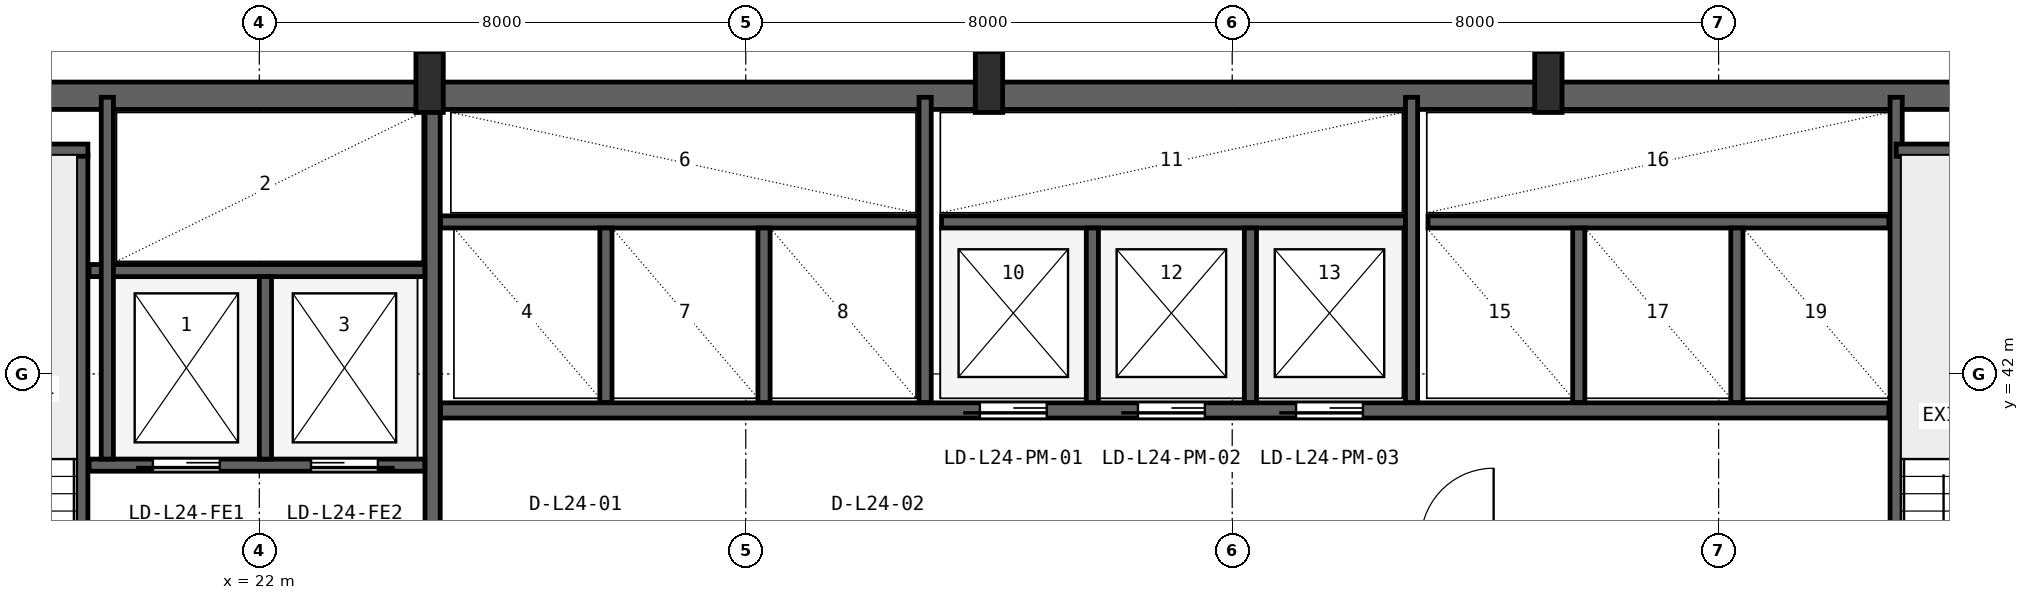
"""IFC4 building model, lengths in metres.
Left out: names, types, materials, properties, quantities, classifications, styles, units other than length and angle.
Written with IfcOpenShell. Run it as: python <this file> out.ifc"""

import sys

from ifc_helpers import new_model, si_unit, direction, frame, frame_2d, origin, origin_2d, place, context, subcontext, project, spatial, rectangle, i_section, extrude, source, transform, mapped, element, fill, save


model = new_model("IFC4")
c1 = context("Model", 3, precision=1e-05, world=origin(), true_north=direction((0.0, 1.0)))
c2 = subcontext(c1, "Body", "Model", "MODEL_VIEW")
j1 = project(units=[si_unit("LENGTHUNIT", "METRE"), si_unit("PLANEANGLEUNIT", "RADIAN")], contexts=[c1])
p1 = place(None, origin())
s1 = spatial("IfcSite", under=j1, at=p1, CompositionType="ELEMENT")
p2 = place(p1, origin())
s2 = spatial("IfcBuilding", under=s1, at=p2, CompositionType="ELEMENT")
p3 = place(p2, frame((0.0, 0.0, 103.0)))
s3 = spatial("IfcBuildingStorey", under=s2, at=p3, CompositionType="ELEMENT", Elevation=103.0)
p4 = place(p3, frame((15.6, 46.575, 0.0), z_axis=(0.0, 0.0, 1.0), x_axis=(1.0, 0.0, 0.0)))
e1 = element("IfcWall", 1, at=p4, inside=s3, PredefinedType="SHEAR", context=c2, shape_type="SweptSolid", body=[
    extrude(rectangle(XDim=36.8, YDim=0.45, at=frame_2d((18.4, 0.0))), origin(), (0.0, 0.0, 1.0), 3.55),
])
m1 = source(origin(), c2, "Body", "SweptSolid", [
    extrude(i_section(OverallWidth=0.45, OverallDepth=1.0, WebThickness=0.016, FlangeThickness=0.03, FilletRadius=0.016, at=origin_2d()), origin(), (0.0, 0.0, 1.0), 3.8),
])
for number, where, z_axis, x_axis in (
    (2, (24.8, 46.8, 0.0), (0.0, 0.0, 1.0), (1.0, 0.0, 0.0)),
    (3, (34.0, 46.8, 0.0), (0.0, 0.0, 1.0), (1.0, 0.0, 0.0)),
    (4, (43.2, 46.8, 0.0), (0.0, 0.0, 1.0), (1.0, 0.0, 0.0)),
):
    element("IfcColumn", number, at=place(p3, frame(where, z_axis=z_axis, x_axis=x_axis)), inside=s3, PredefinedType="COLUMN", context=c2, shape_type="MappedRepresentation", body=[
        mapped(m1, transform((0.0, 0.0, 0.0), x_axis=(1.0, 0.0, 0.0), y_axis=(0.0, 1.0, 0.0), z_axis=(0.0, 0.0, 1.0), scale=1.0)),
    ])
p5 = place(p3, frame((19.08, 35.95, 0.0), z_axis=(0.0, 0.0, 1.0), x_axis=(0.0, 1.0, 0.0)))
e5 = element("IfcWall", 5, at=p5, inside=s3, PredefinedType="SHEAR", context=c2, shape_type="SweptSolid", body=[
    extrude(rectangle(XDim=9.65, YDim=0.2, at=frame_2d((4.825, 0.0))), origin(), (0.0, 0.0, 1.0), 3.55),
])
p6 = place(p5, frame((0.25, 0.0, 0.0)))
e6 = element("IfcOpeningElement", 6, at=p6, cuts=e5, PredefinedType="OPENING", context=c2, shape_type="SweptSolid", body=[
    extrude(rectangle(XDim=0.95, YDim=2.1, at=frame_2d((0.475, 1.05))), frame((0.0, 0.11, 0.0), z_axis=(0.0, -1.0, 0.0), x_axis=(1.0, 0.0, 0.0)), (0.0, 0.0, 1.0), 0.22),
])
p7 = place(p3, frame((15.95, 45.68, 0.0), z_axis=(0.0, 0.0, 1.0), x_axis=(1.0, 0.0, 0.0)))
e7 = element("IfcWall", 7, at=p7, inside=s3, PredefinedType="SHEAR", context=c2, shape_type="SweptSolid", body=[
    extrude(rectangle(XDim=3.23, YDim=0.2, at=frame_2d((1.615, 0.0))), origin(), (0.0, 0.0, 1.0), 3.55),
])
p8 = place(p3, frame((24.85, 36.05, 0.0), z_axis=(0.0, 0.0, 1.0), x_axis=(0.0, 1.0, 0.0)))
e8 = element("IfcWall", 8, at=p8, inside=s3, PredefinedType="SHEAR", context=c2, shape_type="SweptSolid", body=[
    extrude(rectangle(XDim=10.45, YDim=0.25, at=frame_2d((5.225, 0.0))), origin(), (0.0, 0.0, 1.0), 3.55),
])
p9 = place(p3, frame((19.2, 40.5, 0.0), z_axis=(0.0, 0.0, 1.0), x_axis=(1.0, 0.0, 0.0)))
e9 = element("IfcWall", 9, at=p9, inside=s3, PredefinedType="SHEAR", context=c2, shape_type="SweptSolid", body=[
    extrude(rectangle(XDim=5.52, YDim=0.2, at=frame_2d((2.76, 0.0))), origin(), (0.0, 0.0, 1.0), 3.55),
])
p10 = place(p9, frame((1.05, 0.0, 0.0)))
e10 = element("IfcOpeningElement", 10, at=p10, cuts=e9, PredefinedType="OPENING", context=c2, shape_type="SweptSolid", body=[
    extrude(rectangle(XDim=1.1, YDim=2.18, at=frame_2d((0.55, 1.09))), frame((0.0, 0.11, 0.0), z_axis=(0.0, -1.0, 0.0), x_axis=(1.0, 0.0, 0.0)), (0.0, 0.0, 1.0), 0.22),
])
p11 = place(p9, frame((3.65, 0.0, 0.0)))
e11 = element("IfcOpeningElement", 11, at=p11, cuts=e9, PredefinedType="OPENING", context=c2, shape_type="SweptSolid", body=[
    extrude(rectangle(XDim=1.1, YDim=2.18, at=frame_2d((0.55, 1.09))), frame((0.0, 0.11, 0.0), z_axis=(0.0, -1.0, 0.0), x_axis=(1.0, 0.0, 0.0)), (0.0, 0.0, 1.0), 0.22),
])
p12 = place(p3, frame((19.2, 43.7, 0.0), z_axis=(0.0, 0.0, 1.0), x_axis=(1.0, 0.0, 0.0)))
e12 = element("IfcWall", 12, at=p12, inside=s3, PredefinedType="SHEAR", context=c2, shape_type="SweptSolid", body=[
    extrude(rectangle(XDim=5.52, YDim=0.2, at=frame_2d((2.76, 0.0))), origin(), (0.0, 0.0, 1.0), 3.55),
])
p13 = place(p3, frame((22.1, 40.6, 0.0), z_axis=(0.0, 0.0, 1.0), x_axis=(0.0, 1.0, 0.0)))
e13 = element("IfcWall", 13, at=p13, inside=s3, PredefinedType="SHEAR", context=c2, shape_type="SweptSolid", body=[
    extrude(rectangle(XDim=3.0, YDim=0.2, at=frame_2d((1.5, 0.0))), origin(), (0.0, 0.0, 1.0), 3.55),
])
p14 = place(p3, frame((19.5, 40.6, 0.0), z_axis=(0.0, 0.0, 1.0), x_axis=(0.0, 1.0, 0.0)))
e14 = element("IfcWall", 14, at=p14, inside=s3, PredefinedType="SHEAR", context=c2, shape_type="SweptSolid", body=[
    extrude(rectangle(XDim=5.95, YDim=0.2, at=frame_2d((2.975, 0.0))), origin(), (0.0, 0.0, 1.0), 3.55),
])
p15 = place(p3, frame((48.92, 36.05, 0.0), z_axis=(0.0, 0.0, 1.0), x_axis=(0.0, 1.0, 0.0)))
e15 = element("IfcWall", 15, at=p15, inside=s3, PredefinedType="SHEAR", context=c2, shape_type="SweptSolid", body=[
    extrude(rectangle(XDim=10.5, YDim=0.2, at=frame_2d((5.25, 0.0))), origin(), (0.0, 0.0, 1.0), 3.55),
])
p16 = place(p3, frame((48.92, 45.68, 0.0), z_axis=(0.0, 0.0, 1.0), x_axis=(1.0, 0.0, 0.0)))
e16 = element("IfcWall", 16, at=p16, inside=s3, PredefinedType="SHEAR", context=c2, shape_type="SweptSolid", body=[
    extrude(rectangle(XDim=3.18, YDim=0.2, at=frame_2d((1.59, 0.0))), origin(), (0.0, 0.0, 1.0), 3.55),
])
p17 = place(p3, frame((24.98, 41.4, 0.0), z_axis=(0.0, 0.0, 1.0), x_axis=(1.0, 0.0, 0.0)))
e17 = element("IfcWall", 17, at=p17, inside=s3, PredefinedType="SHEAR", context=c2, shape_type="SweptSolid", body=[
    extrude(rectangle(XDim=23.82, YDim=0.25, at=frame_2d((11.91, 0.0))), origin(), (0.0, 0.0, 1.0), 3.55),
])
p18 = place(p17, frame((8.87, 0.0, 0.0)))
e18 = element("IfcOpeningElement", 18, at=p18, cuts=e17, PredefinedType="OPENING", context=c2, shape_type="SweptSolid", body=[
    extrude(rectangle(XDim=1.1, YDim=2.18, at=frame_2d((0.55, 1.09))), frame((0.0, 0.135, 0.0), z_axis=(0.0, -1.0, 0.0), x_axis=(1.0, 0.0, 0.0)), (0.0, 0.0, 1.0), 0.27),
])
p19 = place(p17, frame((11.47, 0.0, 0.0)))
e19 = element("IfcOpeningElement", 19, at=p19, cuts=e17, PredefinedType="OPENING", context=c2, shape_type="SweptSolid", body=[
    extrude(rectangle(XDim=1.1, YDim=2.18, at=frame_2d((0.55, 1.09))), frame((0.0, 0.135, 0.0), z_axis=(0.0, -1.0, 0.0), x_axis=(1.0, 0.0, 0.0)), (0.0, 0.0, 1.0), 0.27),
])
p20 = place(p17, frame((14.07, 0.0, 0.0)))
e20 = element("IfcOpeningElement", 20, at=p20, cuts=e17, PredefinedType="OPENING", context=c2, shape_type="SweptSolid", body=[
    extrude(rectangle(XDim=1.1, YDim=2.18, at=frame_2d((0.55, 1.09))), frame((0.0, 0.135, 0.0), z_axis=(0.0, -1.0, 0.0), x_axis=(1.0, 0.0, 0.0)), (0.0, 0.0, 1.0), 0.27),
])
p21 = place(p3, frame((24.98, 44.5, 0.0), z_axis=(0.0, 0.0, 1.0), x_axis=(1.0, 0.0, 0.0)))
e21 = element("IfcWall", 21, at=p21, inside=s3, PredefinedType="SHEAR", context=c2, shape_type="SweptSolid", body=[
    extrude(rectangle(XDim=7.87, YDim=0.2, at=frame_2d((3.935, 0.0))), origin(), (0.0, 0.0, 1.0), 3.55),
])
for number, where, z_axis, x_axis in (
    (22, (27.7, 41.53, 0.0), (0.0, 0.0, 1.0), (0.0, 1.0, 0.0)),
    (23, (30.3, 41.53, 0.0), (0.0, 0.0, 1.0), (0.0, 1.0, 0.0)),
):
    element("IfcWall", number, at=place(p3, frame(where, z_axis=z_axis, x_axis=x_axis)), inside=s3, PredefinedType="SHEAR", context=c2, shape_type="SweptSolid", body=[
        extrude(rectangle(XDim=2.87, YDim=0.2, at=frame_2d((1.435, 0.0))), origin(), (0.0, 0.0, 1.0), 3.55),
    ])
p22 = place(p3, frame((32.95, 41.53, 0.0), z_axis=(0.0, 0.0, 1.0), x_axis=(0.0, 1.0, 0.0)))
e24 = element("IfcWall", 24, at=p22, inside=s3, PredefinedType="SHEAR", context=c2, shape_type="SweptSolid", body=[
    extrude(rectangle(XDim=5.02, YDim=0.2, at=frame_2d((2.51, 0.0))), origin(), (0.0, 0.0, 1.0), 3.55),
])
p23 = place(p3, frame((33.22, 44.5, 0.0), z_axis=(0.0, 0.0, 1.0), x_axis=(1.0, 0.0, 0.0)))
e25 = element("IfcWall", 25, at=p23, inside=s3, PredefinedType="SHEAR", context=c2, shape_type="SweptSolid", body=[
    extrude(rectangle(XDim=7.63, YDim=0.2, at=frame_2d((3.815, 0.0))), origin(), (0.0, 0.0, 1.0), 3.55),
])
for number, where, z_axis, x_axis in (
    (26, (35.7, 41.53, 0.0), (0.0, 0.0, 1.0), (0.0, 1.0, 0.0)),
    (27, (38.3, 41.53, 0.0), (0.0, 0.0, 1.0), (0.0, 1.0, 0.0)),
):
    element("IfcWall", number, at=place(p3, frame(where, z_axis=z_axis, x_axis=x_axis)), inside=s3, PredefinedType="SHEAR", context=c2, shape_type="SweptSolid", body=[
        extrude(rectangle(XDim=2.87, YDim=0.2, at=frame_2d((1.435, 0.0))), origin(), (0.0, 0.0, 1.0), 3.55),
    ])
p24 = place(p3, frame((40.95, 41.53, 0.0), z_axis=(0.0, 0.0, 1.0), x_axis=(0.0, 1.0, 0.0)))
e28 = element("IfcWall", 28, at=p24, inside=s3, PredefinedType="SHEAR", context=c2, shape_type="SweptSolid", body=[
    extrude(rectangle(XDim=5.02, YDim=0.2, at=frame_2d((2.51, 0.0))), origin(), (0.0, 0.0, 1.0), 3.55),
])
p25 = place(p3, frame((41.22, 44.5, 0.0), z_axis=(0.0, 0.0, 1.0), x_axis=(1.0, 0.0, 0.0)))
e29 = element("IfcWall", 29, at=p25, inside=s3, PredefinedType="SHEAR", context=c2, shape_type="SweptSolid", body=[
    extrude(rectangle(XDim=7.58, YDim=0.2, at=frame_2d((3.79, 0.0))), origin(), (0.0, 0.0, 1.0), 3.55),
])
for number, where, z_axis, x_axis in (
    (30, (43.7, 41.53, 0.0), (0.0, 0.0, 1.0), (0.0, 1.0, 0.0)),
    (31, (46.3, 41.53, 0.0), (0.0, 0.0, 1.0), (0.0, 1.0, 0.0)),
):
    element("IfcWall", number, at=place(p3, frame(where, z_axis=z_axis, x_axis=x_axis)), inside=s3, PredefinedType="SHEAR", context=c2, shape_type="SweptSolid", body=[
        extrude(rectangle(XDim=2.87, YDim=0.2, at=frame_2d((1.435, 0.0))), origin(), (0.0, 0.0, 1.0), 3.55),
    ])
m2 = source(origin(), c2, "Body", "SweptSolid", [
    extrude(rectangle(XDim=1.1, YDim=2.18, at=frame_2d((0.55, 1.09))), frame((0.0, 0.025, 0.0), z_axis=(0.0, -1.0, 0.0), x_axis=(1.0, 0.0, 0.0)), (0.0, 0.0, 1.0), 0.05),
])
p26 = place(p10, frame((1.1, 0.0, 0.0), z_axis=(0.0, 0.0, 1.0), x_axis=(-1.0, 0.0, 0.0)))
e32 = element("IfcDoor", 32, at=p26, inside=s3, OperationType="SLIDING_TO_LEFT", PredefinedType="DOOR", context=c2, shape_type="MappedRepresentation", body=[
    mapped(m2, transform((0.0, 0.0, 0.0), x_axis=(1.0, 0.0, 0.0), y_axis=(0.0, 1.0, 0.0), z_axis=(0.0, 0.0, 1.0), scale=1.0)),
])
fill(e10, e32)
p27 = place(p11, frame((1.1, 0.0, 0.0), z_axis=(0.0, 0.0, 1.0), x_axis=(-1.0, 0.0, 0.0)))
e33 = element("IfcDoor", 33, at=p27, inside=s3, OperationType="SLIDING_TO_RIGHT", PredefinedType="DOOR", context=c2, shape_type="MappedRepresentation", body=[
    mapped(m2, transform((0.0, 0.0, 0.0), x_axis=(1.0, 0.0, 0.0), y_axis=(0.0, 1.0, 0.0), z_axis=(0.0, 0.0, 1.0), scale=1.0)),
])
fill(e11, e33)
p28 = place(p18, frame((1.1, 0.0, 0.0), z_axis=(0.0, 0.0, 1.0), x_axis=(-1.0, 0.0, 0.0)))
e34 = element("IfcDoor", 34, at=p28, inside=s3, OperationType="SLIDING_TO_LEFT", PredefinedType="DOOR", context=c2, shape_type="MappedRepresentation", body=[
    mapped(m2, transform((0.0, 0.0, 0.0), x_axis=(1.0, 0.0, 0.0), y_axis=(0.0, 1.0, 0.0), z_axis=(0.0, 0.0, 1.0), scale=1.0)),
])
fill(e18, e34)
p29 = place(p19, frame((1.1, 0.0, 0.0), z_axis=(0.0, 0.0, 1.0), x_axis=(-1.0, 0.0, 0.0)))
e35 = element("IfcDoor", 35, at=p29, inside=s3, OperationType="SLIDING_TO_LEFT", PredefinedType="DOOR", context=c2, shape_type="MappedRepresentation", body=[
    mapped(m2, transform((0.0, 0.0, 0.0), x_axis=(1.0, 0.0, 0.0), y_axis=(0.0, 1.0, 0.0), z_axis=(0.0, 0.0, 1.0), scale=1.0)),
])
fill(e19, e35)
p30 = place(p20, frame((1.1, 0.0, 0.0), z_axis=(0.0, 0.0, 1.0), x_axis=(-1.0, 0.0, 0.0)))
e36 = element("IfcDoor", 36, at=p30, inside=s3, OperationType="SLIDING_TO_LEFT", PredefinedType="DOOR", context=c2, shape_type="MappedRepresentation", body=[
    mapped(m2, transform((0.0, 0.0, 0.0), x_axis=(1.0, 0.0, 0.0), y_axis=(0.0, 1.0, 0.0), z_axis=(0.0, 0.0, 1.0), scale=1.0)),
])
fill(e20, e36)
save(model, sys.argv[1])
